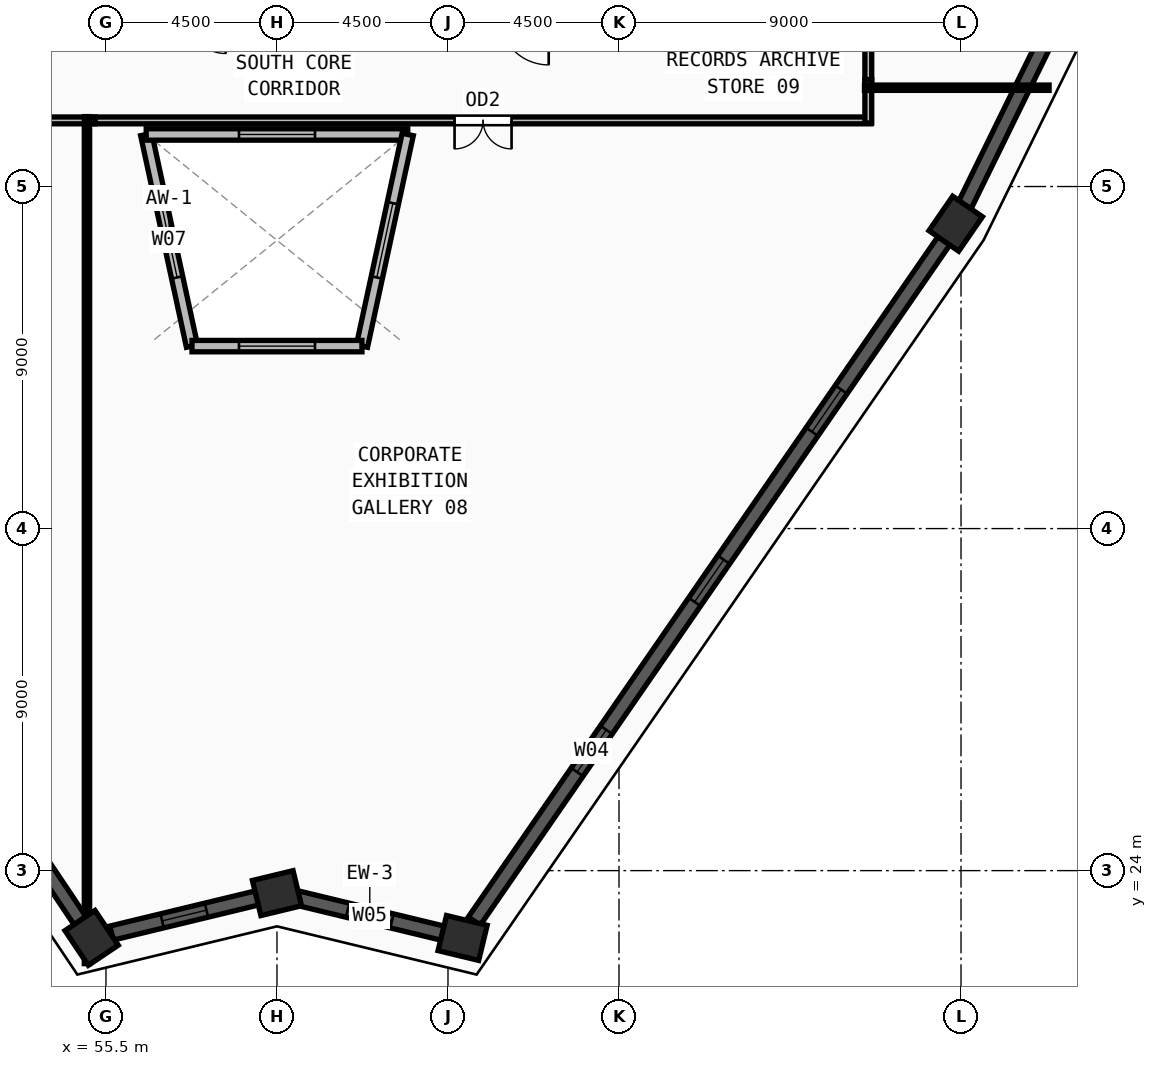
"""IFC4 building model, lengths in metres.
Left out: names, types, materials, properties, quantities, classifications, styles, units other than length and angle.
Written with IfcOpenShell. Run it as: python <this file> out.ifc"""

import sys

from ifc_helpers import new_model, si_unit, direction, frame, frame_2d, origin, origin_2d, place, context, subcontext, project, spatial, rectangle, extrude, source, transform, mapped, element, fill, save


model = new_model("IFC4")
c1 = context("Model", 3, precision=1e-05, world=origin(), true_north=direction((0.0, 1.0)))
c2 = subcontext(c1, "Body", "Model", "MODEL_VIEW")
j1 = project(units=[si_unit("LENGTHUNIT", "METRE"), si_unit("PLANEANGLEUNIT", "RADIAN")], contexts=[c1])
p1 = place(None, origin())
s1 = spatial("IfcSite", under=j1, at=p1, CompositionType="ELEMENT")
p2 = place(p1, origin())
s2 = spatial("IfcBuilding", under=s1, at=p2, CompositionType="ELEMENT")
p3 = place(p2, frame((0.0, 0.0, 309.0)))
s3 = spatial("IfcBuildingStorey", under=s2, at=p3, CompositionType="ELEMENT", Elevation=309.0)
m1 = source(origin(), c2, "Body", "SweptSolid", [
    extrude(rectangle(XDim=1.1, YDim=0.95, at=origin_2d()), origin(), (0.0, 0.0, 1.0), 3.75),
])
for number, where, z_axis, x_axis in (
    (1, (55.123, 22.23, 0.0), (0.0, 0.0, 1.0), (-0.557, 0.83, 0.0)),
    (2, (77.86, 41.022, 0.0), (0.0, 0.0, 1.0), (0.568, 0.823, 0.0)),
    (3, (64.885, 22.228, 0.0), (0.0, 0.0, 1.0), (-0.972, 0.235, 0.0)),
    (4, (60.0, 23.408, 0.0), (0.0, 0.0, 1.0), (0.972, 0.235, 0.0)),
):
    element("IfcColumn", number, at=place(p3, frame(where, z_axis=z_axis, x_axis=x_axis)), inside=s3, PredefinedType="COLUMN", context=c2, shape_type="MappedRepresentation", body=[
        mapped(m1, transform((0.0, 0.0, 0.0), x_axis=(1.0, 0.0, 0.0), y_axis=(0.0, 1.0, 0.0), z_axis=(0.0, 0.0, 1.0), scale=1.0)),
    ])
p4 = place(p3, frame((60.525, 23.281, 0.0), z_axis=(0.0, 0.0, 1.0), x_axis=(0.972065658594, -0.234709086705, 0.0)))
e5 = element("IfcWall", 5, at=p4, inside=s3, PredefinedType="SOLIDWALL", context=c2, shape_type="SweptSolid", body=[
    extrude(rectangle(XDim=3.945, YDim=0.38, at=frame_2d((1.973, 0.0))), origin(), (0.0, 0.0, 1.0), 3.57),
])
m2 = source(origin(), c2, "Body", "SweptSolid", [
    extrude(rectangle(XDim=1.2, YDim=1.9, at=frame_2d((0.6, 0.95))), frame((0.0, 0.2, 0.0), z_axis=(0.0, -1.0, 0.0), x_axis=(1.0, 0.0, 0.0)), (0.0, 0.0, 1.0), 0.4),
])
p5 = place(p4, frame((1.373, 0.0, 0.55)))
e6 = element("IfcOpeningElement", 6, at=p5, cuts=e5, PredefinedType="OPENING", context=c2, shape_type="MappedRepresentation", body=[
    mapped(m2, transform((0.0, 0.0, 0.0), x_axis=(1.0, 0.0, 0.0), y_axis=(0.0, 1.0, 0.0), z_axis=(0.0, 0.0, 1.0), scale=1.0)),
])
p6 = place(p3, frame((65.192, 22.672, 0.0), z_axis=(0.0, 0.0, 1.0), x_axis=(0.568115456304, 0.822948861296, 0.0)))
e7 = element("IfcWall", 7, at=p6, inside=s3, PredefinedType="SOLIDWALL", context=c2, shape_type="SweptSolid", body=[
    extrude(rectangle(XDim=21.758, YDim=0.38, at=frame_2d((10.879, 0.0))), origin(), (0.0, 0.0, 1.0), 3.57),
])
m3 = source(origin(), c2, "Body", "SweptSolid", [
    extrude(rectangle(XDim=1.35, YDim=1.85, at=frame_2d((0.675, 0.925))), frame((0.0, 0.2, 0.0), z_axis=(0.0, -1.0, 0.0), x_axis=(1.0, 0.0, 0.0)), (0.0, 0.0, 1.0), 0.4),
])
p7 = place(p6, frame((4.765, 0.0, 0.55)))
e8 = element("IfcOpeningElement", 8, at=p7, cuts=e7, PredefinedType="OPENING", context=c2, shape_type="MappedRepresentation", body=[
    mapped(m3, transform((0.0, 0.0, 0.0), x_axis=(1.0, 0.0, 0.0), y_axis=(0.0, 1.0, 0.0), z_axis=(0.0, 0.0, 1.0), scale=1.0)),
])
p8 = place(p6, frame((10.204, 0.0, 0.55)))
e9 = element("IfcOpeningElement", 9, at=p8, cuts=e7, PredefinedType="OPENING", context=c2, shape_type="MappedRepresentation", body=[
    mapped(m3, transform((0.0, 0.0, 0.0), x_axis=(1.0, 0.0, 0.0), y_axis=(0.0, 1.0, 0.0), z_axis=(0.0, 0.0, 1.0), scale=1.0)),
])
p9 = place(p6, frame((15.644, 0.0, 0.55)))
e10 = element("IfcOpeningElement", 10, at=p9, cuts=e7, PredefinedType="OPENING", context=c2, shape_type="MappedRepresentation", body=[
    mapped(m3, transform((0.0, 0.0, 0.0), x_axis=(1.0, 0.0, 0.0), y_axis=(0.0, 1.0, 0.0), z_axis=(0.0, 0.0, 1.0), scale=1.0)),
])
p10 = place(p3, frame((78.098, 41.507, 0.0), z_axis=(0.0, 0.0, 1.0), x_axis=(0.440578765421, 0.897713958597, 0.0)))
e11 = element("IfcWall", 11, at=p10, inside=s3, PredefinedType="SOLIDWALL", context=c2, shape_type="SweptSolid", body=[
    extrude(rectangle(XDim=26.366, YDim=0.38, at=frame_2d((13.183, 0.0))), origin(), (0.0, 0.0, 1.0), 3.57),
])
p11 = place(p10, frame((5.066, 0.0, 0.55)))
e12 = element("IfcOpeningElement", 12, at=p11, cuts=e11, PredefinedType="OPENING", context=c2, shape_type="MappedRepresentation", body=[
    mapped(m3, transform((0.0, 0.0, 0.0), x_axis=(1.0, 0.0, 0.0), y_axis=(0.0, 1.0, 0.0), z_axis=(0.0, 0.0, 1.0), scale=1.0)),
])
p12 = place(p10, frame((12.508, 0.0, 0.55)))
e13 = element("IfcOpeningElement", 13, at=p12, cuts=e11, PredefinedType="OPENING", context=c2, shape_type="MappedRepresentation", body=[
    mapped(m3, transform((0.0, 0.0, 0.0), x_axis=(1.0, 0.0, 0.0), y_axis=(0.0, 1.0, 0.0), z_axis=(0.0, 0.0, 1.0), scale=1.0)),
])
p13 = place(p10, frame((19.949, 0.0, 0.55)))
e14 = element("IfcOpeningElement", 14, at=p13, cuts=e11, PredefinedType="OPENING", context=c2, shape_type="MappedRepresentation", body=[
    mapped(m3, transform((0.0, 0.0, 0.0), x_axis=(1.0, 0.0, 0.0), y_axis=(0.0, 1.0, 0.0), z_axis=(0.0, 0.0, 1.0), scale=1.0)),
])
p14 = place(p3, frame((40.132, 44.574, 0.0), z_axis=(0.0, 0.0, 1.0), x_axis=(0.557129450607, -0.830425659085, 0.0)))
e15 = element("IfcWall", 15, at=p14, inside=s3, PredefinedType="SOLIDWALL", context=c2, shape_type="SweptSolid", body=[
    extrude(rectangle(XDim=26.367, YDim=0.38, at=frame_2d((13.184, 0.0))), origin(), (0.0, 0.0, 1.0), 3.57),
])
p15 = place(p14, frame((5.917, 0.0, 0.55)))
e16 = element("IfcOpeningElement", 16, at=p15, cuts=e15, PredefinedType="OPENING", context=c2, shape_type="MappedRepresentation", body=[
    mapped(m3, transform((0.0, 0.0, 0.0), x_axis=(1.0, 0.0, 0.0), y_axis=(0.0, 1.0, 0.0), z_axis=(0.0, 0.0, 1.0), scale=1.0)),
])
p16 = place(p14, frame((12.509, 0.0, 0.55)))
e17 = element("IfcOpeningElement", 17, at=p16, cuts=e15, PredefinedType="OPENING", context=c2, shape_type="MappedRepresentation", body=[
    mapped(m3, transform((0.0, 0.0, 0.0), x_axis=(1.0, 0.0, 0.0), y_axis=(0.0, 1.0, 0.0), z_axis=(0.0, 0.0, 1.0), scale=1.0)),
])
p17 = place(p14, frame((19.1, 0.0, 0.55)))
e18 = element("IfcOpeningElement", 18, at=p17, cuts=e15, PredefinedType="OPENING", context=c2, shape_type="MappedRepresentation", body=[
    mapped(m3, transform((0.0, 0.0, 0.0), x_axis=(1.0, 0.0, 0.0), y_axis=(0.0, 1.0, 0.0), z_axis=(0.0, 0.0, 1.0), scale=1.0)),
])
p18 = place(p3, frame((55.648, 22.357, 0.0), z_axis=(0.0, 0.0, 1.0), x_axis=(0.9720661116, 0.234707210539, 0.0)))
e19 = element("IfcWall", 19, at=p18, inside=s3, PredefinedType="SOLIDWALL", context=c2, shape_type="SweptSolid", body=[
    extrude(rectangle(XDim=3.937, YDim=0.38, at=frame_2d((1.969, 0.0))), origin(), (0.0, 0.0, 1.0), 3.57),
])
p19 = place(p18, frame((1.368, 0.0, 0.55)))
e20 = element("IfcOpeningElement", 20, at=p19, cuts=e19, PredefinedType="OPENING", context=c2, shape_type="MappedRepresentation", body=[
    mapped(m2, transform((0.0, 0.0, 0.0), x_axis=(1.0, 0.0, 0.0), y_axis=(0.0, 1.0, 0.0), z_axis=(0.0, 0.0, 1.0), scale=1.0)),
])
p20 = place(p3, frame((57.764, 37.801, 0.0), z_axis=(0.0, 0.0, 1.0), x_axis=(-0.21145116659, 0.977388563545, 0.0)))
e21 = element("IfcWall", 21, at=p20, inside=s3, PredefinedType="SOLIDWALL", context=c2, shape_type="SweptSolid", body=[
    extrude(rectangle(XDim=5.698, YDim=0.3, at=frame_2d((2.849, 0.0))), origin(), (0.0, 0.0, 1.0), 3.57),
])
m4 = source(origin(), c2, "Body", "SweptSolid", [
    extrude(rectangle(XDim=2.0, YDim=1.9, at=frame_2d((1.0, 0.95))), frame((0.0, 0.16, 0.0), z_axis=(0.0, -1.0, 0.0), x_axis=(1.0, 0.0, 0.0)), (0.0, 0.0, 1.0), 0.32),
])
p21 = place(p20, frame((1.849, 0.0, 0.55)))
e22 = element("IfcOpeningElement", 22, at=p21, cuts=e21, PredefinedType="OPENING", context=c2, shape_type="MappedRepresentation", body=[
    mapped(m4, transform((0.0, 0.0, 0.0), x_axis=(1.0, 0.0, 0.0), y_axis=(0.0, 1.0, 0.0), z_axis=(0.0, 0.0, 1.0), scale=1.0)),
])
p22 = place(p3, frame((56.559, 43.37, 0.0), z_axis=(0.0, 0.0, 1.0), x_axis=(1.0, 0.0, 0.0)))
e23 = element("IfcWall", 23, at=p22, inside=s3, PredefinedType="SOLIDWALL", context=c2, shape_type="SweptSolid", body=[
    extrude(rectangle(XDim=6.882, YDim=0.3, at=frame_2d((3.441, 0.0))), origin(), (0.0, 0.0, 1.0), 3.57),
])
p23 = place(p22, frame((2.441, 0.0, 0.55)))
e24 = element("IfcOpeningElement", 24, at=p23, cuts=e23, PredefinedType="OPENING", context=c2, shape_type="MappedRepresentation", body=[
    mapped(m4, transform((0.0, 0.0, 0.0), x_axis=(1.0, 0.0, 0.0), y_axis=(0.0, 1.0, 0.0), z_axis=(0.0, 0.0, 1.0), scale=1.0)),
])
p24 = place(p3, frame((63.441, 43.37, 0.0), z_axis=(0.0, 0.0, 1.0), x_axis=(-0.21145116659, -0.977388563545, 0.0)))
e25 = element("IfcWall", 25, at=p24, inside=s3, PredefinedType="SOLIDWALL", context=c2, shape_type="SweptSolid", body=[
    extrude(rectangle(XDim=5.698, YDim=0.3, at=frame_2d((2.849, 0.0))), origin(), (0.0, 0.0, 1.0), 3.57),
])
p25 = place(p24, frame((1.849, 0.0, 0.55)))
e26 = element("IfcOpeningElement", 26, at=p25, cuts=e25, PredefinedType="OPENING", context=c2, shape_type="MappedRepresentation", body=[
    mapped(m4, transform((0.0, 0.0, 0.0), x_axis=(1.0, 0.0, 0.0), y_axis=(0.0, 1.0, 0.0), z_axis=(0.0, 0.0, 1.0), scale=1.0)),
])
p26 = place(p3, frame((62.236, 37.801, 0.0), z_axis=(0.0, 0.0, 1.0), x_axis=(-1.0, 0.0, 0.0)))
e27 = element("IfcWall", 27, at=p26, inside=s3, PredefinedType="SOLIDWALL", context=c2, shape_type="SweptSolid", body=[
    extrude(rectangle(XDim=4.472, YDim=0.3, at=frame_2d((2.236, 0.0))), origin(), (0.0, 0.0, 1.0), 3.57),
])
p27 = place(p26, frame((1.236, 0.0, 0.55)))
e28 = element("IfcOpeningElement", 28, at=p27, cuts=e27, PredefinedType="OPENING", context=c2, shape_type="MappedRepresentation", body=[
    mapped(m4, transform((0.0, 0.0, 0.0), x_axis=(1.0, 0.0, 0.0), y_axis=(0.0, 1.0, 0.0), z_axis=(0.0, 0.0, 1.0), scale=1.0)),
])
p28 = place(p3, frame((55.215, 43.74, 0.0), z_axis=(0.0, 0.0, 1.0), x_axis=(-1.0, 0.0, 0.0)))
e29 = element("IfcWall", 29, at=p28, inside=s3, PredefinedType="PARTITIONING", context=c2, shape_type="SweptSolid", body=[
    extrude(rectangle(XDim=10.845, YDim=0.18, at=frame_2d((5.422, 0.0))), origin(), (0.0, 0.0, 1.0), 3.57),
])
m5 = source(origin(), c2, "Body", "SweptSolid", [
    extrude(rectangle(XDim=1.5, YDim=2.2, at=frame_2d((0.75, 1.1))), frame((0.0, 0.1, 0.0), z_axis=(0.0, -1.0, 0.0), x_axis=(1.0, 0.0, 0.0)), (0.0, 0.0, 1.0), 0.2),
])
p29 = place(p28, frame((4.673, 0.0, 0.0)))
e30 = element("IfcOpeningElement", 30, at=p29, cuts=e29, PredefinedType="OPENING", context=c2, shape_type="MappedRepresentation", body=[
    mapped(m5, transform((0.0, 0.0, 0.0), x_axis=(1.0, 0.0, 0.0), y_axis=(0.0, 1.0, 0.0), z_axis=(0.0, 0.0, 1.0), scale=1.0)),
])
p30 = place(p3, frame((75.63, 43.74, 0.0), z_axis=(0.0, 0.0, 1.0), x_axis=(-1.0, 0.0, 0.0)))
e31 = element("IfcWall", 31, at=p30, inside=s3, PredefinedType="PARTITIONING", context=c2, shape_type="SweptSolid", body=[
    extrude(rectangle(XDim=20.415, YDim=0.18, at=frame_2d((10.208, 0.0))), origin(), (0.0, 0.0, 1.0), 3.57),
])
p31 = place(p30, frame((9.457, 0.0, 0.0)))
e32 = element("IfcOpeningElement", 32, at=p31, cuts=e31, PredefinedType="OPENING", context=c2, shape_type="MappedRepresentation", body=[
    mapped(m5, transform((0.0, 0.0, 0.0), x_axis=(1.0, 0.0, 0.0), y_axis=(0.0, 1.0, 0.0), z_axis=(0.0, 0.0, 1.0), scale=1.0)),
])
p32 = place(p3, frame((75.56, 44.815, 0.0), z_axis=(0.0, 0.0, 1.0), x_axis=(0.0, -1.0, 0.0)))
e33 = element("IfcWall", 33, at=p32, inside=s3, PredefinedType="PARTITIONING", context=c2, shape_type="SweptSolid", body=[
    extrude(rectangle(XDim=1.145, YDim=0.18, at=frame_2d((0.573, 0.0))), origin(), (0.0, 0.0, 1.0), 3.57),
])
p33 = place(p3, frame((75.56, 48.21, 0.0), z_axis=(0.0, 0.0, 1.0), x_axis=(0.0, -1.0, 0.0)))
e34 = element("IfcWall", 34, at=p33, inside=s3, PredefinedType="PARTITIONING", context=c2, shape_type="SweptSolid", body=[
    extrude(rectangle(XDim=3.395, YDim=0.18, at=frame_2d((1.698, 0.0))), origin(), (0.0, 0.0, 1.0), 3.57),
])
p34 = place(p3, frame((75.46, 44.6, 0.0), z_axis=(0.0, 0.0, 1.0), x_axis=(1.0, 0.0, 0.0)))
e35 = element("IfcWall", 35, at=p34, inside=s3, PredefinedType="PARTITIONING", context=c2, shape_type="SweptSolid", body=[
    extrude(rectangle(XDim=4.857, YDim=0.14, at=frame_2d((2.428, 0.0))), origin(), (0.0, 0.0, 1.0), 3.57),
])
p35 = place(p3, frame((55.0, 43.84, 0.0), z_axis=(0.0, 0.0, 1.0), x_axis=(0.0, -1.0, 0.0)))
e36 = element("IfcWall", 36, at=p35, inside=s3, PredefinedType="PARTITIONING", context=c2, shape_type="SweptSolid", body=[
    extrude(rectangle(XDim=22.288, YDim=0.14, at=frame_2d((11.144, 0.0))), origin(), (0.0, 0.0, 1.0), 2.967),
])
m6 = source(origin(), c2, "Body", "SweptSolid", [
    extrude(rectangle(XDim=1.2, YDim=1.9, at=frame_2d((0.6, 0.95))), frame((0.0, 0.03, 0.0), z_axis=(0.0, -1.0, 0.0), x_axis=(1.0, 0.0, 0.0)), (0.0, 0.0, 1.0), 0.06),
])
p36 = place(p5, origin())
e37 = element("IfcWindow", 37, at=p36, inside=s3, PartitioningType="SINGLE_PANEL", PredefinedType="WINDOW", context=c2, shape_type="MappedRepresentation", body=[
    mapped(m6, transform((0.0, 0.0, 0.0), x_axis=(1.0, 0.0, 0.0), y_axis=(0.0, 1.0, 0.0), z_axis=(0.0, 0.0, 1.0), scale=1.0)),
])
fill(e6, e37)
m7 = source(origin(), c2, "Body", "SweptSolid", [
    extrude(rectangle(XDim=1.35, YDim=1.85, at=frame_2d((0.675, 0.925))), frame((0.0, 0.03, 0.0), z_axis=(0.0, -1.0, 0.0), x_axis=(1.0, 0.0, 0.0)), (0.0, 0.0, 1.0), 0.06),
])
p37 = place(p7, origin())
e38 = element("IfcWindow", 38, at=p37, inside=s3, PartitioningType="SINGLE_PANEL", PredefinedType="WINDOW", context=c2, shape_type="MappedRepresentation", body=[
    mapped(m7, transform((0.0, 0.0, 0.0), x_axis=(1.0, 0.0, 0.0), y_axis=(0.0, 1.0, 0.0), z_axis=(0.0, 0.0, 1.0), scale=1.0)),
])
fill(e8, e38)
p38 = place(p8, origin())
e39 = element("IfcWindow", 39, at=p38, inside=s3, PartitioningType="SINGLE_PANEL", PredefinedType="WINDOW", context=c2, shape_type="MappedRepresentation", body=[
    mapped(m7, transform((0.0, 0.0, 0.0), x_axis=(1.0, 0.0, 0.0), y_axis=(0.0, 1.0, 0.0), z_axis=(0.0, 0.0, 1.0), scale=1.0)),
])
fill(e9, e39)
p39 = place(p9, origin())
e40 = element("IfcWindow", 40, at=p39, inside=s3, PartitioningType="SINGLE_PANEL", PredefinedType="WINDOW", context=c2, shape_type="MappedRepresentation", body=[
    mapped(m7, transform((0.0, 0.0, 0.0), x_axis=(1.0, 0.0, 0.0), y_axis=(0.0, 1.0, 0.0), z_axis=(0.0, 0.0, 1.0), scale=1.0)),
])
fill(e10, e40)
p40 = place(p19, origin())
e41 = element("IfcWindow", 41, at=p40, inside=s3, PartitioningType="SINGLE_PANEL", PredefinedType="WINDOW", context=c2, shape_type="MappedRepresentation", body=[
    mapped(m6, transform((0.0, 0.0, 0.0), x_axis=(1.0, 0.0, 0.0), y_axis=(0.0, 1.0, 0.0), z_axis=(0.0, 0.0, 1.0), scale=1.0)),
])
fill(e20, e41)
m8 = source(origin(), c2, "Body", "SweptSolid", [
    extrude(rectangle(XDim=2.0, YDim=1.9, at=frame_2d((1.0, 0.95))), frame((0.0, 0.03, 0.0), z_axis=(0.0, -1.0, 0.0), x_axis=(1.0, 0.0, 0.0)), (0.0, 0.0, 1.0), 0.06),
])
p41 = place(p21, origin())
e42 = element("IfcWindow", 42, at=p41, inside=s3, PartitioningType="DOUBLE_PANEL_VERTICAL", PredefinedType="WINDOW", context=c2, shape_type="MappedRepresentation", body=[
    mapped(m8, transform((0.0, 0.0, 0.0), x_axis=(1.0, 0.0, 0.0), y_axis=(0.0, 1.0, 0.0), z_axis=(0.0, 0.0, 1.0), scale=1.0)),
])
fill(e22, e42)
p42 = place(p23, origin())
e43 = element("IfcWindow", 43, at=p42, inside=s3, PartitioningType="DOUBLE_PANEL_VERTICAL", PredefinedType="WINDOW", context=c2, shape_type="MappedRepresentation", body=[
    mapped(m8, transform((0.0, 0.0, 0.0), x_axis=(1.0, 0.0, 0.0), y_axis=(0.0, 1.0, 0.0), z_axis=(0.0, 0.0, 1.0), scale=1.0)),
])
fill(e24, e43)
p43 = place(p25, origin())
e44 = element("IfcWindow", 44, at=p43, inside=s3, PartitioningType="DOUBLE_PANEL_VERTICAL", PredefinedType="WINDOW", context=c2, shape_type="MappedRepresentation", body=[
    mapped(m8, transform((0.0, 0.0, 0.0), x_axis=(1.0, 0.0, 0.0), y_axis=(0.0, 1.0, 0.0), z_axis=(0.0, 0.0, 1.0), scale=1.0)),
])
fill(e26, e44)
p44 = place(p27, origin())
e45 = element("IfcWindow", 45, at=p44, inside=s3, PartitioningType="DOUBLE_PANEL_VERTICAL", PredefinedType="WINDOW", context=c2, shape_type="MappedRepresentation", body=[
    mapped(m8, transform((0.0, 0.0, 0.0), x_axis=(1.0, 0.0, 0.0), y_axis=(0.0, 1.0, 0.0), z_axis=(0.0, 0.0, 1.0), scale=1.0)),
])
fill(e28, e45)
m9 = source(origin(), c2, "Body", "SweptSolid", [
    extrude(rectangle(XDim=1.5, YDim=2.2, at=frame_2d((0.75, 1.1))), frame((0.0, 0.025, 0.0), z_axis=(0.0, -1.0, 0.0), x_axis=(1.0, 0.0, 0.0)), (0.0, 0.0, 1.0), 0.05),
])
p45 = place(p31, origin())
e46 = element("IfcDoor", 46, at=p45, inside=s3, OperationType="DOUBLE_DOOR_SINGLE_SWING", PredefinedType="DOOR", context=c2, shape_type="MappedRepresentation", body=[
    mapped(m9, transform((0.0, 0.0, 0.0), x_axis=(1.0, 0.0, 0.0), y_axis=(0.0, 1.0, 0.0), z_axis=(0.0, 0.0, 1.0), scale=1.0)),
])
fill(e32, e46)
save(model, sys.argv[1])
